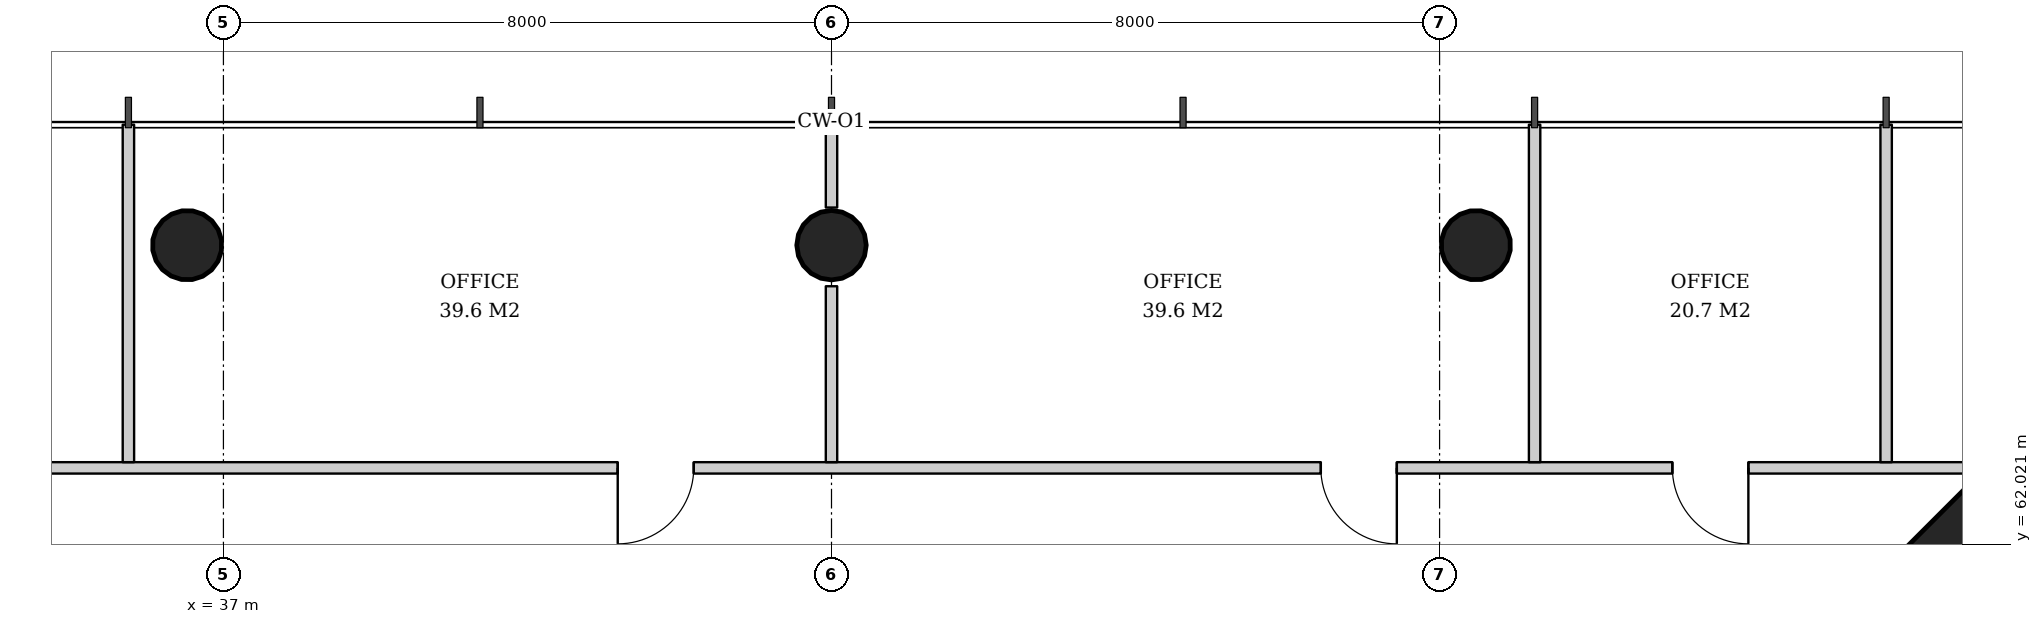
"""IFC4 building model, lengths in metres.
Left out: names, types, materials, properties, quantities, classifications, styles, units other than length and angle.
Written with IfcOpenShell. Run it as: python <this file> out.ifc"""

import sys

from ifc_helpers import new_model, si_unit, direction, frame, frame_2d, origin, origin_2d, place, context, subcontext, project, spatial, rectangle, hollow_circle, extrude, element, fill, save


model = new_model("IFC4")
c1 = context("Model", 3, precision=1e-05, world=origin(), true_north=direction((0.0, 1.0)))
c2 = subcontext(c1, "Body", "Model", "MODEL_VIEW")
j1 = project(units=[si_unit("LENGTHUNIT", "METRE"), si_unit("PLANEANGLEUNIT", "RADIAN")], contexts=[c1])
p1 = place(None, origin())
s1 = spatial("IfcSite", under=j1, at=p1, CompositionType="ELEMENT")
p2 = place(p1, origin())
s2 = spatial("IfcBuilding", under=s1, at=p2, CompositionType="ELEMENT")
p3 = place(p2, frame((0.0, 0.0, 146.4)))
s3 = spatial("IfcBuildingStorey", under=s2, at=p3, CompositionType="ELEMENT", Elevation=146.4)
p4 = place(p3, frame((60.893, 61.893, 0.0), z_axis=(-0.031898107953, -0.031898107953, 0.998981992539), x_axis=(0.707106781187, -0.707106781187, 0.0)))
e1 = element("IfcColumn", 1, at=p4, inside=s3, PredefinedType="COLUMN", context=c2, shape_type="SweptSolid", body=[
    extrude(rectangle(XDim=2.6, YDim=2.6, at=origin_2d()), origin(), (0.0, 0.0, 1.0), 3.804),
])
p5 = place(p3, frame((53.496, 65.993, 0.0), z_axis=(-0.015923015547, -0.031974442509, 0.999361842679), x_axis=(0.895145027055, -0.445775033553, 0.0)))
e2 = element("IfcColumn", 2, at=p5, inside=s3, PredefinedType="COLUMN", context=c2, shape_type="SweptSolid", body=[
    extrude(hollow_circle(Radius=0.457, WallThickness=0.03, at=origin_2d()), origin(), (0.0, 0.0, 1.0), 3.802),
])
p6 = place(p3, frame((45.0, 65.993, 0.0), z_axis=(0.0, -0.031978496719, 0.999488557087), x_axis=(1.0, 0.0, 0.0)))
e3 = element("IfcColumn", 3, at=p6, inside=s3, PredefinedType="COLUMN", context=c2, shape_type="SweptSolid", body=[
    extrude(hollow_circle(Radius=0.457, WallThickness=0.03, at=origin_2d()), origin(), (0.0, 0.0, 1.0), 3.802),
])
p7 = place(p3, frame((36.504, 65.993, 0.0), z_axis=(0.015923015547, -0.031974442509, 0.999361842679), x_axis=(0.895145027055, 0.445775033553, 0.0)))
e4 = element("IfcColumn", 4, at=p7, inside=s3, PredefinedType="COLUMN", context=c2, shape_type="SweptSolid", body=[
    extrude(hollow_circle(Radius=0.457, WallThickness=0.03, at=origin_2d()), origin(), (0.0, 0.0, 1.0), 3.802),
])
p8 = place(p3, frame((60.112, 63.025, 0.0), z_axis=(0.0, 0.0, 1.0), x_axis=(-1.0, 0.0, 0.0)))
e5 = element("IfcWall", 5, at=p8, inside=s3, PredefinedType="PARTITIONING", context=c2, shape_type="SweptSolid", body=[
    extrude(rectangle(XDim=30.223, YDim=0.15, at=frame_2d((15.112, 0.0))), origin(), (0.0, 0.0, 1.0), 2.72),
])
p9 = place(p8, frame((3.049, 0.0, 0.0)))
e6 = element("IfcOpeningElement", 6, at=p9, cuts=e5, PredefinedType="OPENING", context=c2, shape_type="SweptSolid", body=[
    extrude(rectangle(XDim=1.0, YDim=2.1, at=frame_2d((0.5, 1.05))), frame((0.0, 0.085, 0.0), z_axis=(0.0, -1.0, 0.0), x_axis=(1.0, 0.0, 0.0)), (0.0, 0.0, 1.0), 0.17),
])
p10 = place(p8, frame((7.674, 0.0, 0.0)))
e7 = element("IfcOpeningElement", 7, at=p10, cuts=e5, PredefinedType="OPENING", context=c2, shape_type="SweptSolid", body=[
    extrude(rectangle(XDim=1.0, YDim=2.1, at=frame_2d((0.5, 1.05))), frame((0.0, 0.085, 0.0), z_axis=(0.0, -1.0, 0.0), x_axis=(1.0, 0.0, 0.0)), (0.0, 0.0, 1.0), 0.17),
])
p11 = place(p8, frame((16.924, 0.0, 0.0)))
e8 = element("IfcOpeningElement", 8, at=p11, cuts=e5, PredefinedType="OPENING", context=c2, shape_type="SweptSolid", body=[
    extrude(rectangle(XDim=1.0, YDim=2.1, at=frame_2d((0.5, 1.05))), frame((0.0, 0.085, 0.0), z_axis=(0.0, -1.0, 0.0), x_axis=(1.0, 0.0, 0.0)), (0.0, 0.0, 1.0), 0.17),
])
p12 = place(p8, frame((26.174, 0.0, 0.0)))
e9 = element("IfcOpeningElement", 9, at=p12, cuts=e5, PredefinedType="OPENING", context=c2, shape_type="SweptSolid", body=[
    extrude(rectangle(XDim=1.0, YDim=2.1, at=frame_2d((0.5, 1.05))), frame((0.0, 0.085, 0.0), z_axis=(0.0, -1.0, 0.0), x_axis=(1.0, 0.0, 0.0)), (0.0, 0.0, 1.0), 0.17),
])
for number, where, z_axis, x_axis in (
    (10, (58.875, 63.1, 0.0), (0.0, 0.0, 1.0), (0.0, 1.0, 0.0)),
    (11, (54.25, 63.1, 0.0), (0.0, 0.0, 1.0), (0.0, 1.0, 0.0)),
):
    element("IfcWall", number, at=place(p3, frame(where, z_axis=z_axis, x_axis=x_axis)), inside=s3, PredefinedType="PARTITIONING", context=c2, shape_type="SweptSolid", body=[
        extrude(rectangle(XDim=4.44, YDim=0.15, at=frame_2d((2.22, 0.0))), origin(), (0.0, 0.0, 1.0), 2.82),
    ])
p13 = place(p3, frame((45.0, 63.1, 0.0), z_axis=(0.0, 0.0, 1.0), x_axis=(0.0, 1.0, 0.0)))
e12 = element("IfcWall", 12, at=p13, inside=s3, PredefinedType="PARTITIONING", context=c2, shape_type="SweptSolid", body=[
    extrude(rectangle(XDim=2.314, YDim=0.15, at=frame_2d((1.157, 0.0))), origin(), (0.0, 0.0, 1.0), 3.62),
])
p14 = place(p3, frame((45.0, 66.45, 0.0), z_axis=(0.0, 0.0, 1.0), x_axis=(0.0, 1.0, 0.0)))
e13 = element("IfcWall", 13, at=p14, inside=s3, PredefinedType="PARTITIONING", context=c2, shape_type="SweptSolid", body=[
    extrude(rectangle(XDim=1.09, YDim=0.15, at=frame_2d((0.545, 0.0))), origin(), (0.0, 0.0, 1.0), 3.62),
])
p15 = place(p3, frame((35.75, 63.1, 0.0), z_axis=(0.0, 0.0, 1.0), x_axis=(0.0, 1.0, 0.0)))
e14 = element("IfcWall", 14, at=p15, inside=s3, PredefinedType="PARTITIONING", context=c2, shape_type="SweptSolid", body=[
    extrude(rectangle(XDim=4.44, YDim=0.15, at=frame_2d((2.22, 0.0))), origin(), (0.0, 0.0, 1.0), 2.82),
])
p16 = place(p9, origin())
e15 = element("IfcDoor", 15, at=p16, inside=s3, OperationType="SINGLE_SWING_LEFT", PredefinedType="DOOR", context=c2, shape_type="SweptSolid", body=[
    extrude(rectangle(XDim=1.0, YDim=2.1, at=frame_2d((0.5, 1.05))), frame((0.0, 0.025, 0.0), z_axis=(0.0, -1.0, 0.0), x_axis=(1.0, 0.0, 0.0)), (0.0, 0.0, 1.0), 0.05),
])
fill(e6, e15)
p17 = place(p10, origin())
e16 = element("IfcDoor", 16, at=p17, inside=s3, OperationType="SINGLE_SWING_LEFT", PredefinedType="DOOR", context=c2, shape_type="SweptSolid", body=[
    extrude(rectangle(XDim=1.0, YDim=2.1, at=frame_2d((0.5, 1.05))), frame((0.0, 0.025, 0.0), z_axis=(0.0, -1.0, 0.0), x_axis=(1.0, 0.0, 0.0)), (0.0, 0.0, 1.0), 0.05),
])
fill(e7, e16)
p18 = place(p11, origin())
e17 = element("IfcDoor", 17, at=p18, inside=s3, OperationType="SINGLE_SWING_RIGHT", PredefinedType="DOOR", context=c2, shape_type="SweptSolid", body=[
    extrude(rectangle(XDim=1.0, YDim=2.1, at=frame_2d((0.5, 1.05))), frame((0.0, 0.025, 0.0), z_axis=(0.0, -1.0, 0.0), x_axis=(1.0, 0.0, 0.0)), (0.0, 0.0, 1.0), 0.05),
])
fill(e8, e17)
save(model, sys.argv[1])
